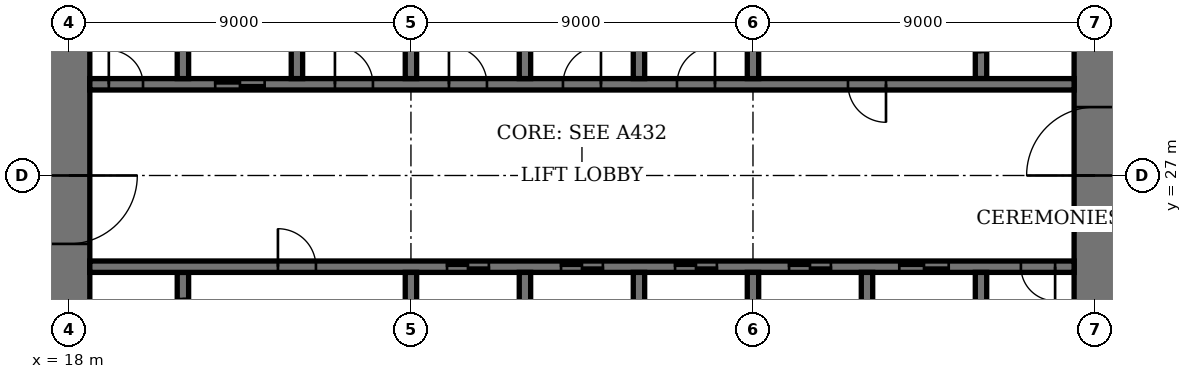
"""IFC4 building model, lengths in metres.
Left out: names, types, materials, properties, quantities, classifications, styles, units other than length and angle.
Written with IfcOpenShell. Run it as: python <this file> out.ifc"""

import sys

from ifc_helpers import new_model, si_unit, direction, frame, frame_2d, origin, place, context, subcontext, project, spatial, rectangle, extrude, element, fill, save


model = new_model("IFC4")
c1 = context("Model", 3, precision=1e-05, world=origin(), true_north=direction((0.0, 1.0)))
c2 = subcontext(c1, "Body", "Model", "MODEL_VIEW")
j1 = project(units=[si_unit("LENGTHUNIT", "METRE"), si_unit("PLANEANGLEUNIT", "RADIAN")], contexts=[c1])
p1 = place(None, origin())
s1 = spatial("IfcSite", under=j1, at=p1, CompositionType="ELEMENT")
p2 = place(p1, origin())
s2 = spatial("IfcBuilding", under=s1, at=p2, CompositionType="ELEMENT")
p3 = place(p2, frame((0.0, 0.0, 279.4)))
s3 = spatial("IfcBuildingStorey", under=s2, at=p3, CompositionType="ELEMENT", Elevation=279.4)
p4 = place(p3, frame((18.0, 35.45, 0.0), z_axis=(0.0, 0.0, 1.0), x_axis=(0.0, -1.0, 0.0)))
e1 = element("IfcWall", 1, at=p4, inside=s3, PredefinedType="SHEAR", context=c2, shape_type="SweptSolid", body=[
    extrude(rectangle(XDim=16.9, YDim=1.1, at=frame_2d((8.45, 0.0))), origin(), (0.0, 0.0, 1.0), 4.0),
])
p5 = place(p4, frame((8.45, 0.0, 0.0)))
e2 = element("IfcOpeningElement", 2, at=p5, cuts=e1, PredefinedType="OPENING", context=c2, shape_type="SweptSolid", body=[
    extrude(rectangle(XDim=1.8, YDim=2.4, at=frame_2d((0.9, 1.2))), frame((0.0, 0.56, 0.0), z_axis=(0.0, -1.0, 0.0), x_axis=(1.0, 0.0, 0.0)), (0.0, 0.0, 1.0), 1.12),
])
p6 = place(p3, frame((45.0, 18.55, 0.0), z_axis=(0.0, 0.0, 1.0), x_axis=(0.0, 1.0, 0.0)))
e3 = element("IfcWall", 3, at=p6, inside=s3, PredefinedType="SHEAR", context=c2, shape_type="SweptSolid", body=[
    extrude(rectangle(XDim=16.9, YDim=1.1, at=frame_2d((8.45, 0.0))), origin(), (0.0, 0.0, 1.0), 4.0),
])
p7 = place(p6, frame((8.45, 0.0, 0.0)))
e4 = element("IfcOpeningElement", 4, at=p7, cuts=e3, PredefinedType="OPENING", context=c2, shape_type="SweptSolid", body=[
    extrude(rectangle(XDim=1.8, YDim=2.4, at=frame_2d((0.9, 1.2))), frame((0.0, 0.56, 0.0), z_axis=(0.0, -1.0, 0.0), x_axis=(1.0, 0.0, 0.0)), (0.0, 0.0, 1.0), 1.12),
])
p8 = place(p3, frame((21.0, 21.95, 0.0), z_axis=(0.0, 0.0, 1.0), x_axis=(0.0, 1.0, 0.0)))
e5 = element("IfcWall", 5, at=p8, inside=s3, PredefinedType="SHEAR", context=c2, shape_type="SweptSolid", body=[
    extrude(rectangle(XDim=2.5, YDim=0.3, at=frame_2d((1.25, 0.0))), origin(), (0.0, 0.0, 1.0), 4.0),
])
p9 = place(p8, frame((0.7, 0.0, 0.0)))
e6 = element("IfcOpeningElement", 6, at=p9, cuts=e5, PredefinedType="OPENING", context=c2, shape_type="SweptSolid", body=[
    extrude(rectangle(XDim=1.1, YDim=2.4, at=frame_2d((0.55, 1.2))), frame((0.0, 0.16, 0.0), z_axis=(0.0, -1.0, 0.0), x_axis=(1.0, 0.0, 0.0)), (0.0, 0.0, 1.0), 0.32),
])
p10 = place(p3, frame((42.0, 29.55, 0.0), z_axis=(0.0, 0.0, 1.0), x_axis=(0.0, 1.0, 0.0)))
e7 = element("IfcWall", 7, at=p10, inside=s3, PredefinedType="SHEAR", context=c2, shape_type="SweptSolid", body=[
    extrude(rectangle(XDim=2.5, YDim=0.3, at=frame_2d((1.25, 0.0))), origin(), (0.0, 0.0, 1.0), 4.0),
])
p11 = place(p10, frame((0.7, 0.0, 0.0)))
e8 = element("IfcOpeningElement", 8, at=p11, cuts=e7, PredefinedType="OPENING", context=c2, shape_type="SweptSolid", body=[
    extrude(rectangle(XDim=1.1, YDim=2.4, at=frame_2d((0.55, 1.2))), frame((0.0, 0.16, 0.0), z_axis=(0.0, -1.0, 0.0), x_axis=(1.0, 0.0, 0.0)), (0.0, 0.0, 1.0), 0.32),
])
p12 = place(p3, frame((18.55, 24.6, 0.0), z_axis=(0.0, 0.0, 1.0), x_axis=(1.0, 0.0, 0.0)))
e9 = element("IfcWall", 9, at=p12, inside=s3, PredefinedType="SHEAR", context=c2, shape_type="SweptSolid", body=[
    extrude(rectangle(XDim=25.9, YDim=0.3, at=frame_2d((12.95, 0.0))), origin(), (0.0, 0.0, 1.0), 4.0),
])
p13 = place(p12, frame((4.95, 0.0, 0.0)))
e10 = element("IfcOpeningElement", 10, at=p13, cuts=e9, PredefinedType="OPENING", context=c2, shape_type="SweptSolid", body=[
    extrude(rectangle(XDim=1.0, YDim=2.4, at=frame_2d((0.5, 1.2))), frame((0.0, 0.16, 0.0), z_axis=(0.0, -1.0, 0.0), x_axis=(1.0, 0.0, 0.0)), (0.0, 0.0, 1.0), 0.32),
])
p14 = place(p12, frame((24.5, 0.0, 0.0)))
e11 = element("IfcOpeningElement", 11, at=p14, cuts=e9, PredefinedType="OPENING", context=c2, shape_type="SweptSolid", body=[
    extrude(rectangle(XDim=0.9, YDim=2.1, at=frame_2d((0.45, 1.05))), frame((0.0, 0.16, 0.0), z_axis=(0.0, -1.0, 0.0), x_axis=(1.0, 0.0, 0.0)), (0.0, 0.0, 1.0), 0.32),
])
p15 = place(p12, frame((9.4, 0.0, 0.0)))
e12 = element("IfcOpeningElement", 12, at=p15, cuts=e9, PredefinedType="OPENING", context=c2, shape_type="SweptSolid", body=[
    extrude(rectangle(XDim=1.1, YDim=2.4, at=frame_2d((0.55, 1.2))), frame((0.0, 0.16, 0.0), z_axis=(0.0, -1.0, 0.0), x_axis=(1.0, 0.0, 0.0)), (0.0, 0.0, 1.0), 0.32),
])
p16 = place(p12, frame((12.4, 0.0, 0.0)))
e13 = element("IfcOpeningElement", 13, at=p16, cuts=e9, PredefinedType="OPENING", context=c2, shape_type="SweptSolid", body=[
    extrude(rectangle(XDim=1.1, YDim=2.4, at=frame_2d((0.55, 1.2))), frame((0.0, 0.16, 0.0), z_axis=(0.0, -1.0, 0.0), x_axis=(1.0, 0.0, 0.0)), (0.0, 0.0, 1.0), 0.32),
])
p17 = place(p12, frame((15.4, 0.0, 0.0)))
e14 = element("IfcOpeningElement", 14, at=p17, cuts=e9, PredefinedType="OPENING", context=c2, shape_type="SweptSolid", body=[
    extrude(rectangle(XDim=1.1, YDim=2.4, at=frame_2d((0.55, 1.2))), frame((0.0, 0.16, 0.0), z_axis=(0.0, -1.0, 0.0), x_axis=(1.0, 0.0, 0.0)), (0.0, 0.0, 1.0), 0.32),
])
p18 = place(p12, frame((18.4, 0.0, 0.0)))
e15 = element("IfcOpeningElement", 15, at=p18, cuts=e9, PredefinedType="OPENING", context=c2, shape_type="SweptSolid", body=[
    extrude(rectangle(XDim=1.1, YDim=2.4, at=frame_2d((0.55, 1.2))), frame((0.0, 0.16, 0.0), z_axis=(0.0, -1.0, 0.0), x_axis=(1.0, 0.0, 0.0)), (0.0, 0.0, 1.0), 0.32),
])
p19 = place(p12, frame((21.3, 0.0, 0.0)))
e16 = element("IfcOpeningElement", 16, at=p19, cuts=e9, PredefinedType="OPENING", context=c2, shape_type="SweptSolid", body=[
    extrude(rectangle(XDim=1.3, YDim=2.4, at=frame_2d((0.65, 1.2))), frame((0.0, 0.16, 0.0), z_axis=(0.0, -1.0, 0.0), x_axis=(1.0, 0.0, 0.0)), (0.0, 0.0, 1.0), 0.32),
])
p20 = place(p3, frame((18.55, 29.4, 0.0), z_axis=(0.0, 0.0, 1.0), x_axis=(1.0, 0.0, 0.0)))
e17 = element("IfcWall", 17, at=p20, inside=s3, PredefinedType="SHEAR", context=c2, shape_type="SweptSolid", body=[
    extrude(rectangle(XDim=25.9, YDim=0.3, at=frame_2d((12.95, 0.0))), origin(), (0.0, 0.0, 1.0), 4.0),
])
p21 = place(p20, frame((19.95, 0.0, 0.0)))
e18 = element("IfcOpeningElement", 18, at=p21, cuts=e17, PredefinedType="OPENING", context=c2, shape_type="SweptSolid", body=[
    extrude(rectangle(XDim=1.0, YDim=2.4, at=frame_2d((0.5, 1.2))), frame((0.0, 0.16, 0.0), z_axis=(0.0, -1.0, 0.0), x_axis=(1.0, 0.0, 0.0)), (0.0, 0.0, 1.0), 0.32),
])
p22 = place(p20, frame((0.5, 0.0, 0.0)))
e19 = element("IfcOpeningElement", 19, at=p22, cuts=e17, PredefinedType="OPENING", context=c2, shape_type="SweptSolid", body=[
    extrude(rectangle(XDim=0.9, YDim=2.1, at=frame_2d((0.45, 1.05))), frame((0.0, 0.16, 0.0), z_axis=(0.0, -1.0, 0.0), x_axis=(1.0, 0.0, 0.0)), (0.0, 0.0, 1.0), 0.32),
])
p23 = place(p20, frame((15.45, 0.0, 0.0)))
e20 = element("IfcOpeningElement", 20, at=p23, cuts=e17, PredefinedType="OPENING", context=c2, shape_type="SweptSolid", body=[
    extrude(rectangle(XDim=1.0, YDim=2.4, at=frame_2d((0.5, 1.2))), frame((0.0, 0.16, 0.0), z_axis=(0.0, -1.0, 0.0), x_axis=(1.0, 0.0, 0.0)), (0.0, 0.0, 1.0), 0.32),
])
p24 = place(p20, frame((12.45, 0.0, 0.0)))
e21 = element("IfcOpeningElement", 21, at=p24, cuts=e17, PredefinedType="OPENING", context=c2, shape_type="SweptSolid", body=[
    extrude(rectangle(XDim=1.0, YDim=2.4, at=frame_2d((0.5, 1.2))), frame((0.0, 0.16, 0.0), z_axis=(0.0, -1.0, 0.0), x_axis=(1.0, 0.0, 0.0)), (0.0, 0.0, 1.0), 0.32),
])
p25 = place(p20, frame((9.45, 0.0, 0.0)))
e22 = element("IfcOpeningElement", 22, at=p25, cuts=e17, PredefinedType="OPENING", context=c2, shape_type="SweptSolid", body=[
    extrude(rectangle(XDim=1.0, YDim=2.4, at=frame_2d((0.5, 1.2))), frame((0.0, 0.16, 0.0), z_axis=(0.0, -1.0, 0.0), x_axis=(1.0, 0.0, 0.0)), (0.0, 0.0, 1.0), 0.32),
])
p26 = place(p20, frame((6.45, 0.0, 0.0)))
e23 = element("IfcOpeningElement", 23, at=p26, cuts=e17, PredefinedType="OPENING", context=c2, shape_type="SweptSolid", body=[
    extrude(rectangle(XDim=1.0, YDim=2.4, at=frame_2d((0.5, 1.2))), frame((0.0, 0.16, 0.0), z_axis=(0.0, -1.0, 0.0), x_axis=(1.0, 0.0, 0.0)), (0.0, 0.0, 1.0), 0.32),
])
p27 = place(p20, frame((3.3, 0.0, 0.0)))
e24 = element("IfcOpeningElement", 24, at=p27, cuts=e17, PredefinedType="OPENING", context=c2, shape_type="SweptSolid", body=[
    extrude(rectangle(XDim=1.3, YDim=2.4, at=frame_2d((0.65, 1.2))), frame((0.0, 0.16, 0.0), z_axis=(0.0, -1.0, 0.0), x_axis=(1.0, 0.0, 0.0)), (0.0, 0.0, 1.0), 0.32),
])
for number, where, z_axis, x_axis in (
    (25, (30.0, 21.75, 0.0), (0.0, 0.0, 1.0), (0.0, 1.0, 0.0)),
    (26, (33.0, 29.55, 0.0), (0.0, 0.0, 1.0), (0.0, 1.0, 0.0)),
    (27, (33.0, 21.75, 0.0), (0.0, 0.0, 1.0), (0.0, 1.0, 0.0)),
    (28, (30.0, 29.55, 0.0), (0.0, 0.0, 1.0), (0.0, 1.0, 0.0)),
    (29, (36.0, 21.75, 0.0), (0.0, 0.0, 1.0), (0.0, 1.0, 0.0)),
    (30, (27.0, 29.55, 0.0), (0.0, 0.0, 1.0), (0.0, 1.0, 0.0)),
):
    element("IfcWall", number, at=place(p3, frame(where, z_axis=z_axis, x_axis=x_axis)), inside=s3, PredefinedType="SHEAR", context=c2, shape_type="SweptSolid", body=[
        extrude(rectangle(XDim=2.7, YDim=0.3, at=frame_2d((1.35, 0.0))), origin(), (0.0, 0.0, 1.0), 4.0),
    ])
for number, where, z_axis, x_axis in (
    (31, (39.0, 18.55, 0.0), (0.0, 0.0, 1.0), (0.0, 1.0, 0.0)),
    (32, (24.0, 29.55, 0.0), (0.0, 0.0, 1.0), (0.0, 1.0, 0.0)),
):
    element("IfcWall", number, at=place(p3, frame(where, z_axis=z_axis, x_axis=x_axis)), inside=s3, PredefinedType="SHEAR", context=c2, shape_type="SweptSolid", body=[
        extrude(rectangle(XDim=5.9, YDim=0.3, at=frame_2d((2.95, 0.0))), origin(), (0.0, 0.0, 1.0), 4.0),
    ])
for number, where, z_axis, x_axis in (
    (33, (42.0, 21.75, 0.0), (0.0, 0.0, 1.0), (0.0, 1.0, 0.0)),
    (34, (21.0, 29.55, 0.0), (0.0, 0.0, 1.0), (0.0, 1.0, 0.0)),
):
    element("IfcWall", number, at=place(p3, frame(where, z_axis=z_axis, x_axis=x_axis)), inside=s3, PredefinedType="SHEAR", context=c2, shape_type="SweptSolid", body=[
        extrude(rectangle(XDim=2.7, YDim=0.3, at=frame_2d((1.35, 0.0))), origin(), (0.0, 0.0, 1.0), 4.0),
    ])
for number, where, z_axis, x_axis in (
    (35, (27.0, 21.6, 0.0), (0.0, 0.0, 1.0), (0.0, 1.0, 0.0)),
    (36, (36.0, 29.55, 0.0), (0.0, 0.0, 1.0), (0.0, 1.0, 0.0)),
):
    element("IfcWall", number, at=place(p3, frame(where, z_axis=z_axis, x_axis=x_axis)), inside=s3, PredefinedType="SHEAR", context=c2, shape_type="SweptSolid", body=[
        extrude(rectangle(XDim=2.85, YDim=0.3, at=frame_2d((1.425, 0.0))), origin(), (0.0, 0.0, 1.0), 4.0),
    ])
p28 = place(p5, origin())
e37 = element("IfcDoor", 37, at=p28, inside=s3, OperationType="DOUBLE_DOOR_DOUBLE_SWING", PredefinedType="DOOR", context=c2, shape_type="SweptSolid", body=[
    extrude(rectangle(XDim=1.8, YDim=2.4, at=frame_2d((0.9, 1.2))), frame((0.0, 0.03, 0.0), z_axis=(0.0, -1.0, 0.0), x_axis=(1.0, 0.0, 0.0)), (0.0, 0.0, 1.0), 0.06),
    extrude(rectangle(XDim=0.04, YDim=2.4, at=frame_2d((0.02, 1.2))), frame((0.0, 0.55, 0.0), z_axis=(0.0, -1.0, 0.0), x_axis=(1.0, 0.0, 0.0)), (0.0, 0.0, 1.0), 1.1),
    extrude(rectangle(XDim=0.04, YDim=2.4, at=frame_2d((1.78, 1.2))), frame((0.0, 0.55, 0.0), z_axis=(0.0, -1.0, 0.0), x_axis=(1.0, 0.0, 0.0)), (0.0, 0.0, 1.0), 1.1),
    extrude(rectangle(XDim=1.8, YDim=0.04, at=frame_2d((0.9, 2.38))), frame((0.0, 0.55, 0.0), z_axis=(0.0, -1.0, 0.0), x_axis=(1.0, 0.0, 0.0)), (0.0, 0.0, 1.0), 1.1),
])
fill(e2, e37)
p29 = place(p7, origin())
e38 = element("IfcDoor", 38, at=p29, inside=s3, OperationType="DOUBLE_DOOR_DOUBLE_SWING", PredefinedType="DOOR", context=c2, shape_type="SweptSolid", body=[
    extrude(rectangle(XDim=1.8, YDim=2.4, at=frame_2d((0.9, 1.2))), frame((0.0, 0.03, 0.0), z_axis=(0.0, -1.0, 0.0), x_axis=(1.0, 0.0, 0.0)), (0.0, 0.0, 1.0), 0.06),
    extrude(rectangle(XDim=0.04, YDim=2.4, at=frame_2d((0.02, 1.2))), frame((0.0, 0.55, 0.0), z_axis=(0.0, -1.0, 0.0), x_axis=(1.0, 0.0, 0.0)), (0.0, 0.0, 1.0), 1.1),
    extrude(rectangle(XDim=0.04, YDim=2.4, at=frame_2d((1.78, 1.2))), frame((0.0, 0.55, 0.0), z_axis=(0.0, -1.0, 0.0), x_axis=(1.0, 0.0, 0.0)), (0.0, 0.0, 1.0), 1.1),
    extrude(rectangle(XDim=1.8, YDim=0.04, at=frame_2d((0.9, 2.38))), frame((0.0, 0.55, 0.0), z_axis=(0.0, -1.0, 0.0), x_axis=(1.0, 0.0, 0.0)), (0.0, 0.0, 1.0), 1.1),
])
fill(e4, e38)
p30 = place(p13, origin())
e39 = element("IfcDoor", 39, at=p30, inside=s3, OperationType="SINGLE_SWING_RIGHT", PredefinedType="DOOR", context=c2, shape_type="SweptSolid", body=[
    extrude(rectangle(XDim=1.0, YDim=2.4, at=frame_2d((0.5, 1.2))), frame((0.0, 0.03, 0.0), z_axis=(0.0, -1.0, 0.0), x_axis=(1.0, 0.0, 0.0)), (0.0, 0.0, 1.0), 0.06),
])
fill(e10, e39)
p31 = place(p21, origin())
e40 = element("IfcDoor", 40, at=p31, inside=s3, OperationType="SINGLE_SWING_RIGHT", PredefinedType="DOOR", context=c2, shape_type="SweptSolid", body=[
    extrude(rectangle(XDim=1.0, YDim=2.4, at=frame_2d((0.5, 1.2))), frame((0.0, 0.03, 0.0), z_axis=(0.0, -1.0, 0.0), x_axis=(1.0, 0.0, 0.0)), (0.0, 0.0, 1.0), 0.06),
])
fill(e18, e40)
p32 = place(p14, origin())
e41 = element("IfcDoor", 41, at=p32, inside=s3, OperationType="SINGLE_SWING_RIGHT", PredefinedType="DOOR", context=c2, shape_type="SweptSolid", body=[
    extrude(rectangle(XDim=0.9, YDim=2.1, at=frame_2d((0.45, 1.05))), frame((0.0, 0.03, 0.0), z_axis=(0.0, -1.0, 0.0), x_axis=(1.0, 0.0, 0.0)), (0.0, 0.0, 1.0), 0.06),
])
fill(e11, e41)
p33 = place(p22, origin())
e42 = element("IfcDoor", 42, at=p33, inside=s3, OperationType="SINGLE_SWING_RIGHT", PredefinedType="DOOR", context=c2, shape_type="SweptSolid", body=[
    extrude(rectangle(XDim=0.9, YDim=2.1, at=frame_2d((0.45, 1.05))), frame((0.0, 0.03, 0.0), z_axis=(0.0, -1.0, 0.0), x_axis=(1.0, 0.0, 0.0)), (0.0, 0.0, 1.0), 0.06),
])
fill(e19, e42)
p34 = place(p15, origin())
e43 = element("IfcDoor", 43, at=p34, inside=s3, OperationType="DOUBLE_DOOR_SLIDING", PredefinedType="DOOR", context=c2, shape_type="SweptSolid", body=[
    extrude(rectangle(XDim=1.1, YDim=2.4, at=frame_2d((0.55, 1.2))), frame((0.0, 0.02, 0.0), z_axis=(0.0, -1.0, 0.0), x_axis=(1.0, 0.0, 0.0)), (0.0, 0.0, 1.0), 0.04),
])
fill(e12, e43)
p35 = place(p16, origin())
e44 = element("IfcDoor", 44, at=p35, inside=s3, OperationType="DOUBLE_DOOR_SLIDING", PredefinedType="DOOR", context=c2, shape_type="SweptSolid", body=[
    extrude(rectangle(XDim=1.1, YDim=2.4, at=frame_2d((0.55, 1.2))), frame((0.0, 0.02, 0.0), z_axis=(0.0, -1.0, 0.0), x_axis=(1.0, 0.0, 0.0)), (0.0, 0.0, 1.0), 0.04),
])
fill(e13, e44)
p36 = place(p17, origin())
e45 = element("IfcDoor", 45, at=p36, inside=s3, OperationType="DOUBLE_DOOR_SLIDING", PredefinedType="DOOR", context=c2, shape_type="SweptSolid", body=[
    extrude(rectangle(XDim=1.1, YDim=2.4, at=frame_2d((0.55, 1.2))), frame((0.0, 0.02, 0.0), z_axis=(0.0, -1.0, 0.0), x_axis=(1.0, 0.0, 0.0)), (0.0, 0.0, 1.0), 0.04),
])
fill(e14, e45)
p37 = place(p18, origin())
e46 = element("IfcDoor", 46, at=p37, inside=s3, OperationType="DOUBLE_DOOR_SLIDING", PredefinedType="DOOR", context=c2, shape_type="SweptSolid", body=[
    extrude(rectangle(XDim=1.1, YDim=2.4, at=frame_2d((0.55, 1.2))), frame((0.0, 0.02, 0.0), z_axis=(0.0, -1.0, 0.0), x_axis=(1.0, 0.0, 0.0)), (0.0, 0.0, 1.0), 0.04),
])
fill(e15, e46)
p38 = place(p23, origin())
e47 = element("IfcDoor", 47, at=p38, inside=s3, OperationType="SINGLE_SWING_LEFT", PredefinedType="DOOR", context=c2, shape_type="SweptSolid", body=[
    extrude(rectangle(XDim=1.0, YDim=2.4, at=frame_2d((0.5, 1.2))), frame((0.0, 0.03, 0.0), z_axis=(0.0, -1.0, 0.0), x_axis=(1.0, 0.0, 0.0)), (0.0, 0.0, 1.0), 0.06),
])
fill(e20, e47)
p39 = place(p24, origin())
e48 = element("IfcDoor", 48, at=p39, inside=s3, OperationType="SINGLE_SWING_LEFT", PredefinedType="DOOR", context=c2, shape_type="SweptSolid", body=[
    extrude(rectangle(XDim=1.0, YDim=2.4, at=frame_2d((0.5, 1.2))), frame((0.0, 0.03, 0.0), z_axis=(0.0, -1.0, 0.0), x_axis=(1.0, 0.0, 0.0)), (0.0, 0.0, 1.0), 0.06),
])
fill(e21, e48)
p40 = place(p25, origin())
e49 = element("IfcDoor", 49, at=p40, inside=s3, OperationType="SINGLE_SWING_RIGHT", PredefinedType="DOOR", context=c2, shape_type="SweptSolid", body=[
    extrude(rectangle(XDim=1.0, YDim=2.4, at=frame_2d((0.5, 1.2))), frame((0.0, 0.03, 0.0), z_axis=(0.0, -1.0, 0.0), x_axis=(1.0, 0.0, 0.0)), (0.0, 0.0, 1.0), 0.06),
])
fill(e22, e49)
p41 = place(p26, origin())
e50 = element("IfcDoor", 50, at=p41, inside=s3, OperationType="SINGLE_SWING_RIGHT", PredefinedType="DOOR", context=c2, shape_type="SweptSolid", body=[
    extrude(rectangle(XDim=1.0, YDim=2.4, at=frame_2d((0.5, 1.2))), frame((0.0, 0.03, 0.0), z_axis=(0.0, -1.0, 0.0), x_axis=(1.0, 0.0, 0.0)), (0.0, 0.0, 1.0), 0.06),
])
fill(e23, e50)
p42 = place(p19, origin())
e51 = element("IfcDoor", 51, at=p42, inside=s3, OperationType="DOUBLE_DOOR_SLIDING", PredefinedType="DOOR", context=c2, shape_type="SweptSolid", body=[
    extrude(rectangle(XDim=1.3, YDim=2.4, at=frame_2d((0.65, 1.2))), frame((0.0, 0.02, 0.0), z_axis=(0.0, -1.0, 0.0), x_axis=(1.0, 0.0, 0.0)), (0.0, 0.0, 1.0), 0.04),
])
fill(e16, e51)
p43 = place(p27, origin())
e52 = element("IfcDoor", 52, at=p43, inside=s3, OperationType="DOUBLE_DOOR_SLIDING", PredefinedType="DOOR", context=c2, shape_type="SweptSolid", body=[
    extrude(rectangle(XDim=1.3, YDim=2.4, at=frame_2d((0.65, 1.2))), frame((0.0, 0.02, 0.0), z_axis=(0.0, -1.0, 0.0), x_axis=(1.0, 0.0, 0.0)), (0.0, 0.0, 1.0), 0.04),
])
fill(e24, e52)
save(model, sys.argv[1])
